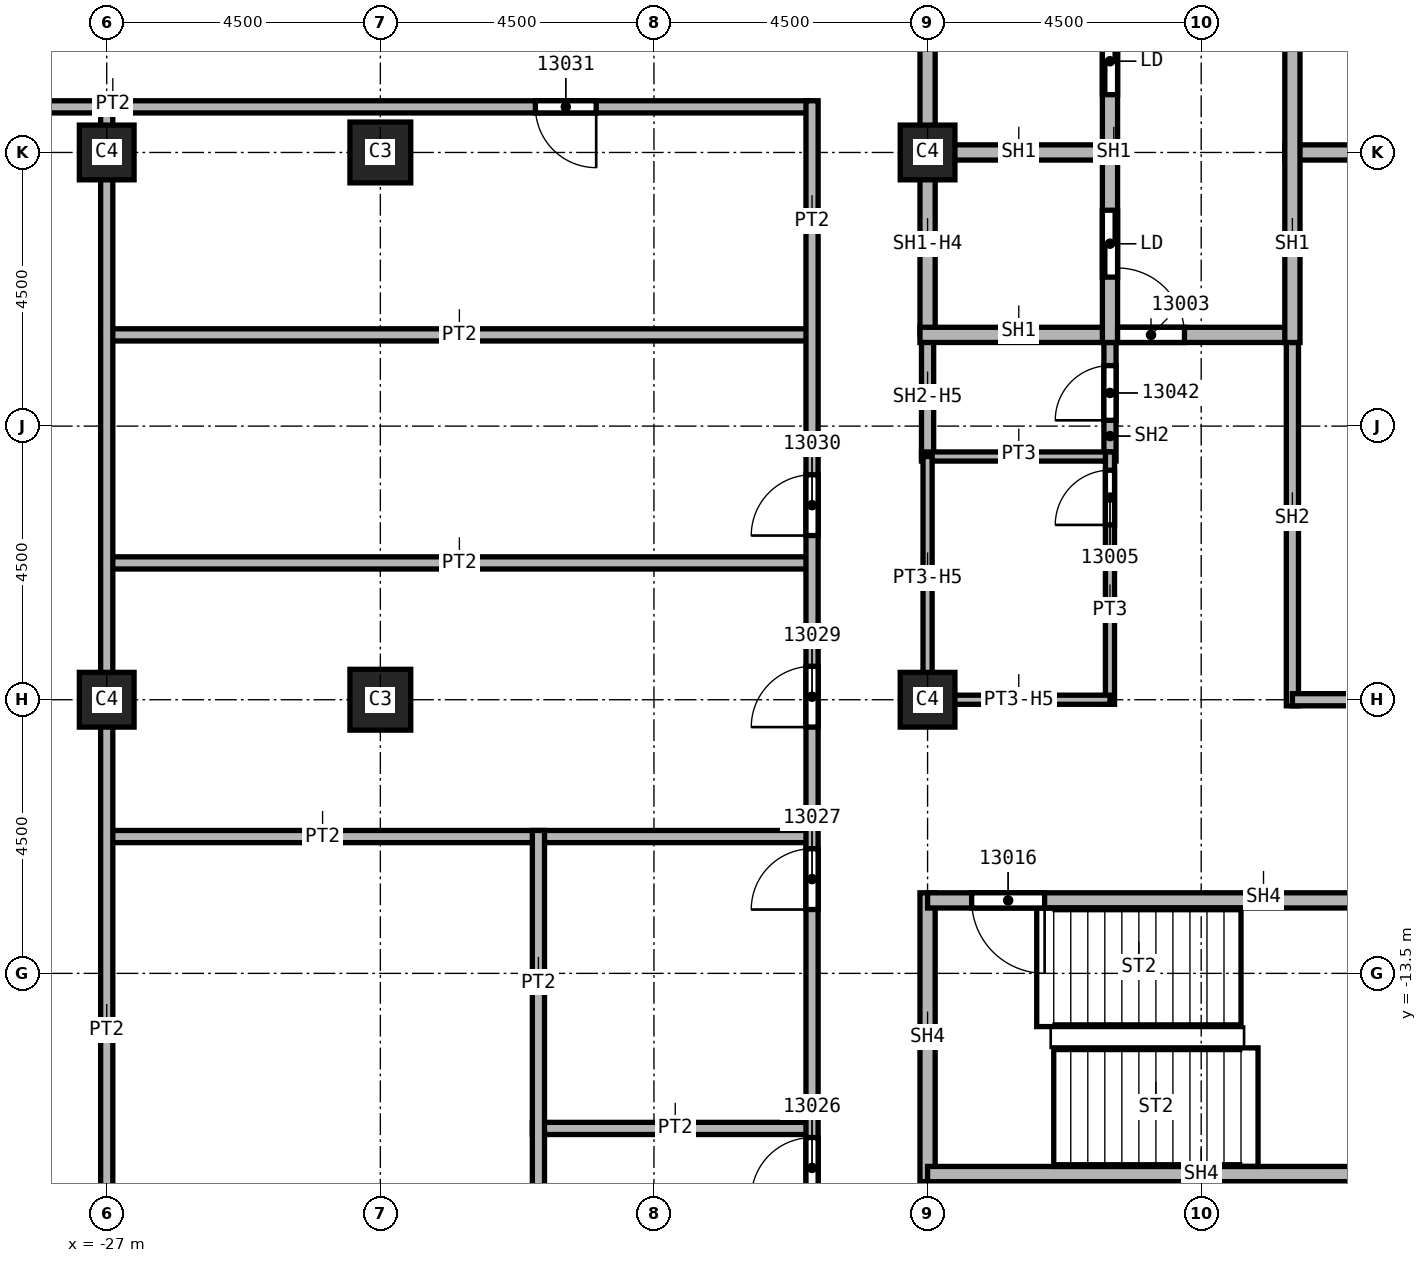
"""IFC4 building model, lengths in metres.
Left out: names, types, materials, properties, quantities, classifications, styles, units other than length and angle.
Written with IfcOpenShell. Run it as: python <this file> out.ifc"""

import sys

from ifc_helpers import new_model, si_unit, direction, frame, frame_2d, origin, origin_2d, place, context, subcontext, project, spatial, rectangle, extrude, element, fill, save


model = new_model("IFC4")
c1 = context("Model", 3, precision=1e-05, world=origin(), true_north=direction((0.0, 1.0)))
c2 = subcontext(c1, "Body", "Model", "MODEL_VIEW")
j1 = project(units=[si_unit("LENGTHUNIT", "METRE"), si_unit("PLANEANGLEUNIT", "RADIAN")], contexts=[c1])
p1 = place(None, origin())
s1 = spatial("IfcSite", under=j1, at=p1, CompositionType="ELEMENT")
p2 = place(p1, origin())
s2 = spatial("IfcBuilding", under=s1, at=p2, CompositionType="ELEMENT")
p3 = place(p2, frame((0.0, 0.0, 208.0)))
s3 = spatial("IfcBuildingStorey", under=s2, at=p3, CompositionType="ELEMENT", Elevation=208.0)
for number, where, z_axis, x_axis in (
    (1, (-22.5, 0.0, 0.0), (0.0, 0.0, 1.0), (1.0, 0.0, 0.0)),
    (2, (-22.5, -9.0, 0.0), (0.0, 0.0, 1.0), (1.0, 0.0, 0.0)),
):
    element("IfcColumn", number, at=place(p3, frame(where, z_axis=z_axis, x_axis=x_axis)), inside=s3, PredefinedType="COLUMN", context=c2, shape_type="SweptSolid", body=[
        extrude(rectangle(XDim=1.0, YDim=1.0, at=origin_2d()), origin(), (0.0, 0.0, 1.0), 3.72),
    ])
for number, where, z_axis, x_axis in (
    (3, (-13.5, 0.0, 0.0), (0.0, 0.0, 1.0), (1.0, 0.0, 0.0)),
    (4, (-13.5, -9.0, 0.0), (0.0, 0.0, 1.0), (1.0, 0.0, 0.0)),
    (5, (-27.0, 0.0, 0.0), (0.0, 0.0, 1.0), (1.0, 0.0, 0.0)),
    (6, (-27.0, -9.0, 0.0), (0.0, 0.0, 1.0), (1.0, 0.0, 0.0)),
):
    element("IfcColumn", number, at=place(p3, frame(where, z_axis=z_axis, x_axis=x_axis)), inside=s3, PredefinedType="COLUMN", context=c2, shape_type="SweptSolid", body=[
        extrude(rectangle(XDim=0.9, YDim=0.9, at=origin_2d()), origin(), (0.0, 0.0, 1.0), 3.72),
    ])
for number, where, z_axis, x_axis in (
    (7, (-27.1, -11.25, 0.0), (0.0, 0.0, 1.0), (1.0, 0.0, 0.0)),
    (8, (-27.1, -6.75, 0.0), (0.0, 0.0, 1.0), (1.0, 0.0, 0.0)),
    (9, (-27.1, -3.0, 0.0), (0.0, 0.0, 1.0), (1.0, 0.0, 0.0)),
):
    element("IfcWall", number, at=place(p3, frame(where, z_axis=z_axis, x_axis=x_axis)), inside=s3, PredefinedType="PARTITIONING", context=c2, shape_type="SweptSolid", body=[
        extrude(rectangle(XDim=11.7, YDim=0.2, at=frame_2d((5.85, 0.0))), origin(), (0.0, 0.0, 1.0), 3.72),
    ])
p4 = place(p3, frame((-27.0, -17.5, 0.0), z_axis=(0.0, 0.0, 1.0), x_axis=(0.0, 1.0, 0.0)))
e10 = element("IfcWall", 10, at=p4, inside=s3, PredefinedType="PARTITIONING", context=c2, shape_type="SweptSolid", body=[
    extrude(rectangle(XDim=18.25, YDim=0.2, at=frame_2d((9.125, 0.0))), origin(), (0.0, 0.0, 1.0), 3.72),
])
p5 = place(p3, frame((-15.4, 0.75, 0.0), z_axis=(0.0, 0.0, 1.0), x_axis=(-1.0, 0.0, 0.0)))
e11 = element("IfcWall", 11, at=p5, inside=s3, PredefinedType="PARTITIONING", context=c2, shape_type="SweptSolid", body=[
    extrude(rectangle(XDim=18.45, YDim=0.2, at=frame_2d((9.225, 0.0))), origin(), (0.0, 0.0, 1.0), 3.72),
])
p6 = place(p5, frame((3.55, 0.0, 0.0)))
e12 = element("IfcOpeningElement", 12, at=p6, cuts=e11, PredefinedType="OPENING", context=c2, shape_type="SweptSolid", body=[
    extrude(rectangle(XDim=1.0, YDim=2.1, at=frame_2d((0.5, 1.05))), frame((0.0, 0.1, 0.0), z_axis=(0.0, -1.0, 0.0), x_axis=(1.0, 0.0, 0.0)), (0.0, 0.0, 1.0), 0.2),
])
p7 = place(p3, frame((-20.0, -16.05, 0.0), z_axis=(0.0, 0.0, 1.0), x_axis=(1.0, 0.0, 0.0)))
e13 = element("IfcWall", 13, at=p7, inside=s3, PredefinedType="PARTITIONING", context=c2, shape_type="SweptSolid", body=[
    extrude(rectangle(XDim=4.6, YDim=0.2, at=frame_2d((2.3, 0.0))), origin(), (0.0, 0.0, 1.0), 3.72),
])
p8 = place(p3, frame((-19.9, -22.4, 0.0), z_axis=(0.0, 0.0, 1.0), x_axis=(0.0, 1.0, 0.0)))
e14 = element("IfcWall", 14, at=p8, inside=s3, PredefinedType="PARTITIONING", context=c2, shape_type="SweptSolid", body=[
    extrude(rectangle(XDim=11.25, YDim=0.2, at=frame_2d((5.625, 0.0))), origin(), (0.0, 0.0, 1.0), 3.72),
])
p9 = place(p8, frame((3.55, 0.0, 0.0)))
e15 = element("IfcOpeningElement", 15, at=p9, cuts=e14, PredefinedType="OPENING", context=c2, shape_type="SweptSolid", body=[
    extrude(rectangle(XDim=1.0, YDim=2.1, at=frame_2d((0.5, 1.05))), frame((0.0, 0.1, 0.0), z_axis=(0.0, -1.0, 0.0), x_axis=(1.0, 0.0, 0.0)), (0.0, 0.0, 1.0), 0.2),
])
p10 = place(p3, frame((-15.4, -22.4, 0.0), z_axis=(0.0, 0.0, 1.0), x_axis=(0.0, 1.0, 0.0)))
e16 = element("IfcWall", 16, at=p10, inside=s3, PredefinedType="PARTITIONING", context=c2, shape_type="SweptSolid", body=[
    extrude(rectangle(XDim=23.25, YDim=0.2, at=frame_2d((11.625, 0.0))), origin(), (0.0, 0.0, 1.0), 3.72),
])
p11 = place(p10, frame((5.2, 0.0, 0.0)))
e17 = element("IfcOpeningElement", 17, at=p11, cuts=e16, PredefinedType="OPENING", context=c2, shape_type="SweptSolid", body=[
    extrude(rectangle(XDim=1.0, YDim=2.1, at=frame_2d((0.5, 1.05))), frame((0.0, 0.1, 0.0), z_axis=(0.0, -1.0, 0.0), x_axis=(1.0, 0.0, 0.0)), (0.0, 0.0, 1.0), 0.2),
])
p12 = place(p10, frame((9.95, 0.0, 0.0)))
e18 = element("IfcOpeningElement", 18, at=p12, cuts=e16, PredefinedType="OPENING", context=c2, shape_type="SweptSolid", body=[
    extrude(rectangle(XDim=1.0, YDim=2.1, at=frame_2d((0.5, 1.05))), frame((0.0, 0.1, 0.0), z_axis=(0.0, -1.0, 0.0), x_axis=(1.0, 0.0, 0.0)), (0.0, 0.0, 1.0), 0.2),
])
p13 = place(p10, frame((12.95, 0.0, 0.0)))
e19 = element("IfcOpeningElement", 19, at=p13, cuts=e16, PredefinedType="OPENING", context=c2, shape_type="SweptSolid", body=[
    extrude(rectangle(XDim=1.0, YDim=2.1, at=frame_2d((0.5, 1.05))), frame((0.0, 0.1, 0.0), z_axis=(0.0, -1.0, 0.0), x_axis=(1.0, 0.0, 0.0)), (0.0, 0.0, 1.0), 0.2),
])
p14 = place(p10, frame((16.1, 0.0, 0.0)))
e20 = element("IfcOpeningElement", 20, at=p14, cuts=e16, PredefinedType="OPENING", context=c2, shape_type="SweptSolid", body=[
    extrude(rectangle(XDim=1.0, YDim=2.1, at=frame_2d((0.5, 1.05))), frame((0.0, 0.1, 0.0), z_axis=(0.0, -1.0, 0.0), x_axis=(1.0, 0.0, 0.0)), (0.0, 0.0, 1.0), 0.2),
])
p15 = place(p3, frame((-13.5, -16.675, 0.0), z_axis=(0.0, 0.0, 1.0), x_axis=(0.0, -1.0, 0.0)))
e21 = element("IfcWall", 21, at=p15, inside=s3, PredefinedType="PARTITIONING", context=c2, shape_type="SweptSolid", body=[
    extrude(rectangle(XDim=5.625, YDim=0.2, at=frame_2d((2.812, 0.0))), origin(), (0.0, 0.0, 1.0), 3.72),
])
p16 = place(p15, frame((2.35, 0.0, 0.0)))
e22 = element("IfcOpeningElement", 22, at=p16, cuts=e21, PredefinedType="OPENING", context=c2, shape_type="SweptSolid", body=[
    extrude(rectangle(XDim=1.0, YDim=2.1, at=frame_2d((0.5, 1.05))), frame((0.0, 0.1, 0.0), z_axis=(0.0, -1.0, 0.0), x_axis=(1.0, 0.0, 0.0)), (0.0, 0.0, 1.0), 0.2),
])
p17 = place(p3, frame((-13.5, -5.0, 0.0), z_axis=(0.0, 0.0, 1.0), x_axis=(0.0, 1.0, 0.0)))
e23 = element("IfcWall", 23, at=p17, inside=s3, PredefinedType="SOLIDWALL", context=c2, shape_type="SweptSolid", body=[
    extrude(rectangle(XDim=2.0, YDim=0.2, at=frame_2d((1.0, 0.0))), origin(), (0.0, 0.0, 1.0), 2.958),
])
p18 = place(p3, frame((-10.5, -5.075, 0.0), z_axis=(0.0, 0.0, 1.0), x_axis=(0.0, 1.0, 0.0)))
e24 = element("IfcWall", 24, at=p18, inside=s3, PredefinedType="SOLIDWALL", context=c2, shape_type="SweptSolid", body=[
    extrude(rectangle(XDim=2.2, YDim=0.2, at=frame_2d((1.1, 0.0))), origin(), (0.0, 0.0, 1.0), 3.72),
])
p19 = place(p18, frame((0.67, 0.0, 0.0)))
e25 = element("IfcOpeningElement", 25, at=p19, cuts=e24, PredefinedType="OPENING", context=c2, shape_type="SweptSolid", body=[
    extrude(rectangle(XDim=0.9, YDim=2.1, at=frame_2d((0.45, 1.05))), frame((0.0, 0.1, 0.0), z_axis=(0.0, -1.0, 0.0), x_axis=(1.0, 0.0, 0.0)), (0.0, 0.0, 1.0), 0.2),
])
p20 = place(p3, frame((-7.5, -9.1, 0.0), z_axis=(0.0, 0.0, 1.0), x_axis=(0.0, 1.0, 0.0)))
e26 = element("IfcWall", 26, at=p20, inside=s3, PredefinedType="SOLIDWALL", context=c2, shape_type="SweptSolid", body=[
    extrude(rectangle(XDim=6.225, YDim=0.2, at=frame_2d((3.113, 0.0))), origin(), (0.0, 0.0, 1.0), 3.72),
])
p21 = place(p3, frame((-4.5, -9.0, 0.0), z_axis=(0.0, 0.0, 1.0), x_axis=(-1.0, 0.0, 0.0)))
e27 = element("IfcWall", 27, at=p21, inside=s3, PredefinedType="SOLIDWALL", context=c2, shape_type="SweptSolid", body=[
    extrude(rectangle(XDim=3.0, YDim=0.2, at=frame_2d((1.5, 0.0))), origin(), (0.0, 0.0, 1.0), 2.958),
])
p22 = place(p3, frame((-13.625, 0.0, 0.0), z_axis=(0.0, 0.0, 1.0), x_axis=(1.0, 0.0, 0.0)))
e28 = element("IfcWall", 28, at=p22, inside=s3, PredefinedType="SOLIDWALL", context=c2, shape_type="SweptSolid", body=[
    extrude(rectangle(XDim=3.125, YDim=0.25, at=frame_2d((1.562, 0.0))), origin(), (0.0, 0.0, 1.0), 3.72),
])
p23 = place(p3, frame((-13.5, -3.0, 0.0), z_axis=(0.0, 0.0, 1.0), x_axis=(0.0, 1.0, 0.0)))
e29 = element("IfcWall", 29, at=p23, inside=s3, PredefinedType="SOLIDWALL", context=c2, shape_type="SweptSolid", body=[
    extrude(rectangle(XDim=6.0, YDim=0.25, at=frame_2d((3.0, 0.0))), origin(), (0.0, 0.0, 1.0), 2.958),
])
p24 = place(p3, frame((-13.625, -3.0, 0.0), z_axis=(0.0, 0.0, 1.0), x_axis=(1.0, 0.0, 0.0)))
e30 = element("IfcWall", 30, at=p24, inside=s3, PredefinedType="SOLIDWALL", context=c2, shape_type="SweptSolid", body=[
    extrude(rectangle(XDim=6.125, YDim=0.25, at=frame_2d((3.062, 0.0))), origin(), (0.0, 0.0, 1.0), 3.72),
])
p25 = place(p24, frame((3.25, 0.0, 0.0)))
e31 = element("IfcOpeningElement", 31, at=p25, cuts=e30, PredefinedType="OPENING", context=c2, shape_type="SweptSolid", body=[
    extrude(rectangle(XDim=1.1, YDim=2.1, at=frame_2d((0.55, 1.05))), frame((0.0, 0.125, 0.0), z_axis=(0.0, -1.0, 0.0), x_axis=(1.0, 0.0, 0.0)), (0.0, 0.0, 1.0), 0.25),
])
p26 = place(p3, frame((-10.5, -3.125, 0.0), z_axis=(0.0, 0.0, 1.0), x_axis=(0.0, 1.0, 0.0)))
e32 = element("IfcWall", 32, at=p26, inside=s3, PredefinedType="SOLIDWALL", context=c2, shape_type="SweptSolid", body=[
    extrude(rectangle(XDim=6.25, YDim=0.25, at=frame_2d((3.125, 0.0))), origin(), (0.0, 0.0, 1.0), 3.72),
])
p27 = place(p26, frame((1.075, 0.0, 0.0)))
e33 = element("IfcOpeningElement", 33, at=p27, cuts=e32, PredefinedType="OPENING", context=c2, shape_type="SweptSolid", body=[
    extrude(rectangle(XDim=1.1, YDim=2.1, at=frame_2d((0.55, 1.05))), frame((0.0, 0.125, 0.0), z_axis=(0.0, -1.0, 0.0), x_axis=(1.0, 0.0, 0.0)), (0.0, 0.0, 1.0), 0.25),
])
p28 = place(p26, frame((4.075, 0.0, 0.0)))
e34 = element("IfcOpeningElement", 34, at=p28, cuts=e32, PredefinedType="OPENING", context=c2, shape_type="SweptSolid", body=[
    extrude(rectangle(XDim=1.1, YDim=2.1, at=frame_2d((0.55, 1.05))), frame((0.0, 0.125, 0.0), z_axis=(0.0, -1.0, 0.0), x_axis=(1.0, 0.0, 0.0)), (0.0, 0.0, 1.0), 0.25),
])
p29 = place(p3, frame((-7.625, 0.0, 0.0), z_axis=(0.0, 0.0, 1.0), x_axis=(1.0, 0.0, 0.0)))
e35 = element("IfcWall", 35, at=p29, inside=s3, PredefinedType="SOLIDWALL", context=c2, shape_type="SweptSolid", body=[
    extrude(rectangle(XDim=3.25, YDim=0.25, at=frame_2d((1.625, 0.0))), origin(), (0.0, 0.0, 1.0), 3.72),
])
p30 = place(p3, frame((-7.5, -3.125, 0.0), z_axis=(0.0, 0.0, 1.0), x_axis=(0.0, 1.0, 0.0)))
e36 = element("IfcWall", 36, at=p30, inside=s3, PredefinedType="SOLIDWALL", context=c2, shape_type="SweptSolid", body=[
    extrude(rectangle(XDim=9.125, YDim=0.25, at=frame_2d((4.562, 0.0))), origin(), (0.0, 0.0, 1.0), 3.72),
])
p31 = place(p3, frame((-13.5, -12.175, 0.0), z_axis=(0.0, 0.0, 1.0), x_axis=(0.0, -1.0, 0.0)))
e37 = element("IfcWall", 37, at=p31, inside=s3, PredefinedType="SOLIDWALL", context=c2, shape_type="SweptSolid", body=[
    extrude(rectangle(XDim=4.75, YDim=0.25, at=frame_2d((2.375, 0.0))), origin(), (0.0, 0.0, 1.0), 3.72),
])
p32 = place(p3, frame((-4.5, -16.8, 0.0), z_axis=(0.0, 0.0, 1.0), x_axis=(-1.0, 0.0, 0.0)))
e38 = element("IfcWall", 38, at=p32, inside=s3, PredefinedType="SOLIDWALL", context=c2, shape_type="SweptSolid", body=[
    extrude(rectangle(XDim=9.0, YDim=0.25, at=frame_2d((4.5, 0.0))), origin(), (0.0, 0.0, 1.0), 3.72),
])
p33 = place(p3, frame((-4.375, -12.3, 0.0), z_axis=(0.0, 0.0, 1.0), x_axis=(-1.0, 0.0, 0.0)))
e39 = element("IfcWall", 39, at=p33, inside=s3, PredefinedType="SOLIDWALL", context=c2, shape_type="SweptSolid", body=[
    extrude(rectangle(XDim=9.125, YDim=0.25, at=frame_2d((4.562, 0.0))), origin(), (0.0, 0.0, 1.0), 3.72),
])
p34 = place(p33, frame((7.2, 0.0, 0.0)))
e40 = element("IfcOpeningElement", 40, at=p34, cuts=e39, PredefinedType="OPENING", context=c2, shape_type="SweptSolid", body=[
    extrude(rectangle(XDim=1.2, YDim=2.1, at=frame_2d((0.6, 1.05))), frame((0.0, 0.125, 0.0), z_axis=(0.0, -1.0, 0.0), x_axis=(1.0, 0.0, 0.0)), (0.0, 0.0, 1.0), 0.25),
])
p35 = place(p3, frame((-13.6, -5.0, 0.0), z_axis=(0.0, 0.0, 1.0), x_axis=(1.0, 0.0, 0.0)))
e41 = element("IfcWall", 41, at=p35, inside=s3, PredefinedType="PARTITIONING", context=c2, shape_type="SweptSolid", body=[
    extrude(rectangle(XDim=3.1, YDim=0.15, at=frame_2d((1.55, 0.0))), origin(), (0.0, 0.0, 1.0), 3.72),
])
p36 = place(p3, frame((-13.5, -9.075, 0.0), z_axis=(0.0, 0.0, 1.0), x_axis=(0.0, 1.0, 0.0)))
e42 = element("IfcWall", 42, at=p36, inside=s3, PredefinedType="PARTITIONING", context=c2, shape_type="SweptSolid", body=[
    extrude(rectangle(XDim=4.075, YDim=0.15, at=frame_2d((2.038, 0.0))), origin(), (0.0, 0.0, 1.0), 2.958),
])
p37 = place(p3, frame((-10.5, -9.075, 0.0), z_axis=(0.0, 0.0, 1.0), x_axis=(0.0, 1.0, 0.0)))
e43 = element("IfcWall", 43, at=p37, inside=s3, PredefinedType="PARTITIONING", context=c2, shape_type="SweptSolid", body=[
    extrude(rectangle(XDim=4.15, YDim=0.15, at=frame_2d((2.075, 0.0))), origin(), (0.0, 0.0, 1.0), 3.72),
])
p38 = place(p37, frame((2.95, 0.0, 0.0)))
e44 = element("IfcOpeningElement", 44, at=p38, cuts=e43, PredefinedType="OPENING", context=c2, shape_type="SweptSolid", body=[
    extrude(rectangle(XDim=0.9, YDim=2.1, at=frame_2d((0.45, 1.05))), frame((0.0, 0.075, 0.0), z_axis=(0.0, -1.0, 0.0), x_axis=(1.0, 0.0, 0.0)), (0.0, 0.0, 1.0), 0.15),
])
p39 = place(p3, frame((-10.5, -9.0, 0.0), z_axis=(0.0, 0.0, 1.0), x_axis=(-1.0, 0.0, 0.0)))
e45 = element("IfcWall", 45, at=p39, inside=s3, PredefinedType="PARTITIONING", context=c2, shape_type="SweptSolid", body=[
    extrude(rectangle(XDim=3.0, YDim=0.15, at=frame_2d((1.5, 0.0))), origin(), (0.0, 0.0, 1.0), 2.958),
])
p40 = place(p25, origin())
e46 = element("IfcDoor", 46, at=p40, inside=s3, OperationType="SINGLE_SWING_RIGHT", PredefinedType="DOOR", context=c2, shape_type="SweptSolid", body=[
    extrude(rectangle(XDim=1.1, YDim=2.1, at=frame_2d((0.55, 1.05))), frame((0.0, 0.025, 0.0), z_axis=(0.0, -1.0, 0.0), x_axis=(1.0, 0.0, 0.0)), (0.0, 0.0, 1.0), 0.05),
])
fill(e31, e46)
p41 = place(p38, origin())
e47 = element("IfcDoor", 47, at=p41, inside=s3, OperationType="SINGLE_SWING_RIGHT", PredefinedType="DOOR", context=c2, shape_type="SweptSolid", body=[
    extrude(rectangle(XDim=0.9, YDim=2.1, at=frame_2d((0.45, 1.05))), frame((0.0, 0.025, 0.0), z_axis=(0.0, -1.0, 0.0), x_axis=(1.0, 0.0, 0.0)), (0.0, 0.0, 1.0), 0.05),
])
fill(e44, e47)
p42 = place(p34, origin())
e48 = element("IfcDoor", 48, at=p42, inside=s3, OperationType="SINGLE_SWING_LEFT", PredefinedType="DOOR", context=c2, shape_type="SweptSolid", body=[
    extrude(rectangle(XDim=1.2, YDim=2.1, at=frame_2d((0.6, 1.05))), frame((0.0, 0.025, 0.0), z_axis=(0.0, -1.0, 0.0), x_axis=(1.0, 0.0, 0.0)), (0.0, 0.0, 1.0), 0.05),
])
fill(e40, e48)
p43 = place(p11, origin())
e49 = element("IfcDoor", 49, at=p43, inside=s3, OperationType="SINGLE_SWING_LEFT", PredefinedType="DOOR", context=c2, shape_type="SweptSolid", body=[
    extrude(rectangle(XDim=1.0, YDim=2.1, at=frame_2d((0.5, 1.05))), frame((0.0, 0.025, 0.0), z_axis=(0.0, -1.0, 0.0), x_axis=(1.0, 0.0, 0.0)), (0.0, 0.0, 1.0), 0.05),
])
fill(e17, e49)
p44 = place(p12, origin())
e50 = element("IfcDoor", 50, at=p44, inside=s3, OperationType="SINGLE_SWING_RIGHT", PredefinedType="DOOR", context=c2, shape_type="SweptSolid", body=[
    extrude(rectangle(XDim=1.0, YDim=2.1, at=frame_2d((0.5, 1.05))), frame((0.0, 0.025, 0.0), z_axis=(0.0, -1.0, 0.0), x_axis=(1.0, 0.0, 0.0)), (0.0, 0.0, 1.0), 0.05),
])
fill(e18, e50)
p45 = place(p13, origin())
e51 = element("IfcDoor", 51, at=p45, inside=s3, OperationType="SINGLE_SWING_RIGHT", PredefinedType="DOOR", context=c2, shape_type="SweptSolid", body=[
    extrude(rectangle(XDim=1.0, YDim=2.1, at=frame_2d((0.5, 1.05))), frame((0.0, 0.025, 0.0), z_axis=(0.0, -1.0, 0.0), x_axis=(1.0, 0.0, 0.0)), (0.0, 0.0, 1.0), 0.05),
])
fill(e19, e51)
p46 = place(p14, origin())
e52 = element("IfcDoor", 52, at=p46, inside=s3, OperationType="SINGLE_SWING_LEFT", PredefinedType="DOOR", context=c2, shape_type="SweptSolid", body=[
    extrude(rectangle(XDim=1.0, YDim=2.1, at=frame_2d((0.5, 1.05))), frame((0.0, 0.025, 0.0), z_axis=(0.0, -1.0, 0.0), x_axis=(1.0, 0.0, 0.0)), (0.0, 0.0, 1.0), 0.05),
])
fill(e20, e52)
p47 = place(p6, origin())
e53 = element("IfcDoor", 53, at=p47, inside=s3, OperationType="SINGLE_SWING_RIGHT", PredefinedType="DOOR", context=c2, shape_type="SweptSolid", body=[
    extrude(rectangle(XDim=1.0, YDim=2.1, at=frame_2d((0.5, 1.05))), frame((0.0, 0.025, 0.0), z_axis=(0.0, -1.0, 0.0), x_axis=(1.0, 0.0, 0.0)), (0.0, 0.0, 1.0), 0.05),
])
fill(e12, e53)
p48 = place(p19, origin())
e54 = element("IfcDoor", 54, at=p48, inside=s3, OperationType="SINGLE_SWING_LEFT", PredefinedType="DOOR", context=c2, shape_type="SweptSolid", body=[
    extrude(rectangle(XDim=0.9, YDim=2.1, at=frame_2d((0.45, 1.05))), frame((0.0, 0.025, 0.0), z_axis=(0.0, -1.0, 0.0), x_axis=(1.0, 0.0, 0.0)), (0.0, 0.0, 1.0), 0.05),
])
fill(e25, e54)
p49 = place(p27, origin())
e55 = element("IfcDoor", 55, at=p49, inside=s3, OperationType="SLIDING_TO_LEFT", PredefinedType="DOOR", context=c2, shape_type="SweptSolid", body=[
    extrude(rectangle(XDim=1.1, YDim=2.1, at=frame_2d((0.55, 1.05))), frame((0.0, 0.025, 0.0), z_axis=(0.0, -1.0, 0.0), x_axis=(1.0, 0.0, 0.0)), (0.0, 0.0, 1.0), 0.05),
])
fill(e33, e55)
p50 = place(p28, origin())
e56 = element("IfcDoor", 56, at=p50, inside=s3, OperationType="SLIDING_TO_LEFT", PredefinedType="DOOR", context=c2, shape_type="SweptSolid", body=[
    extrude(rectangle(XDim=1.1, YDim=2.1, at=frame_2d((0.55, 1.05))), frame((0.0, 0.025, 0.0), z_axis=(0.0, -1.0, 0.0), x_axis=(1.0, 0.0, 0.0)), (0.0, 0.0, 1.0), 0.05),
])
fill(e34, e56)
save(model, sys.argv[1])
